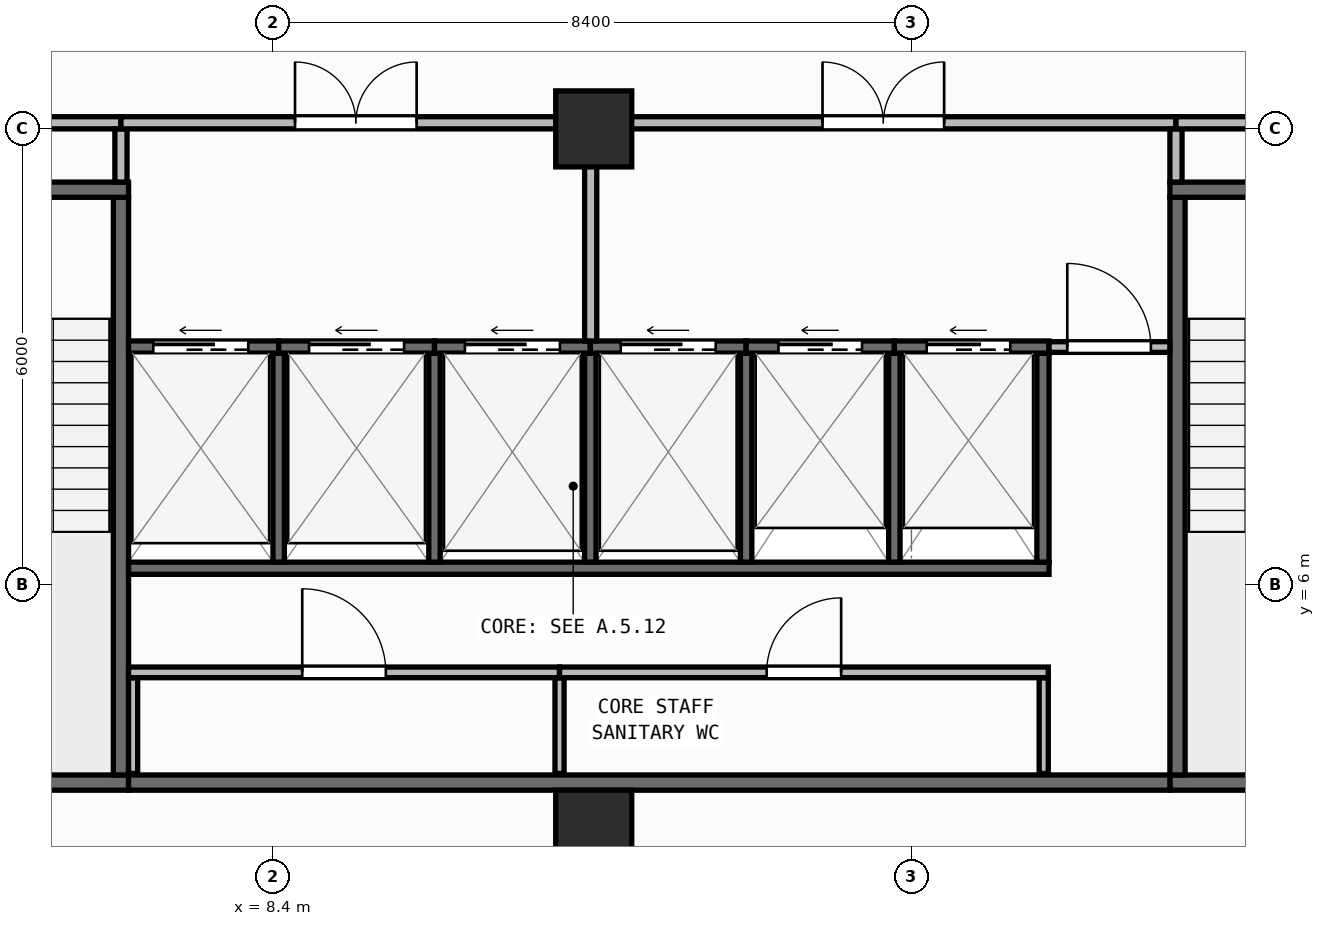
"""IFC4 building model, lengths in metres.
Left out: names, types, materials, properties, quantities, classifications, styles, units other than length and angle.
Written with IfcOpenShell. Run it as: python <this file> out.ifc"""

import sys

from ifc_helpers import new_model, si_unit, direction, frame, frame_2d, origin, origin_2d, place, context, subcontext, project, spatial, rectangle, extrude, element, fill, save


model = new_model("IFC4")
c1 = context("Model", 3, precision=1e-05, world=origin(), true_north=direction((0.0, 1.0)))
c2 = subcontext(c1, "Body", "Model", "MODEL_VIEW")
j1 = project(units=[si_unit("LENGTHUNIT", "METRE"), si_unit("PLANEANGLEUNIT", "RADIAN")], contexts=[c1])
p1 = place(None, origin())
s1 = spatial("IfcSite", under=j1, at=p1, CompositionType="ELEMENT")
p2 = place(p1, origin())
s2 = spatial("IfcBuilding", under=s1, at=p2, CompositionType="ELEMENT")
p3 = place(p2, frame((0.0, 0.0, 231.6)))
s3 = spatial("IfcBuildingStorey", under=s2, at=p3, CompositionType="ELEMENT", Elevation=231.6)
for number, where, z_axis, x_axis in (
    (1, (12.62, 2.8, 0.0), (0.0, 0.0, 1.0), (1.0, 0.0, 0.0)),
    (2, (12.62, 12.0, 0.0), (0.0, 0.0, 1.0), (1.0, 0.0, 0.0)),
):
    element("IfcColumn", number, at=place(p3, frame(where, z_axis=z_axis, x_axis=x_axis)), inside=s3, PredefinedType="COLUMN", context=c2, shape_type="SweptSolid", body=[
        extrude(rectangle(XDim=1.0, YDim=1.0, at=origin_2d()), origin(), (0.0, 0.0, 1.0), 3.95),
    ])
p4 = place(p3, frame((2.66, 0.174, 0.0), z_axis=(0.0, 0.0, 1.0), x_axis=(0.996634028439, 0.081979347142, 0.0)))
e3 = element("IfcWall", 3, at=p4, inside=s3, PredefinedType="STANDARD", context=c2, shape_type="SweptSolid", body=[
    extrude(rectangle(XDim=46.035, YDim=0.26, at=frame_2d((23.018, 0.0))), origin(), (0.0, 0.0, 1.0), 3.67),
])
p5 = place(p4, frame((21.817, 0.0, 0.9)))
e4 = element("IfcOpeningElement", 4, at=p5, cuts=e3, PredefinedType="OPENING", context=c2, shape_type="SweptSolid", body=[
    extrude(rectangle(XDim=2.4, YDim=1.65, at=frame_2d((1.2, 0.825))), frame((0.0, 0.14, 0.0), z_axis=(0.0, -1.0, 0.0), x_axis=(1.0, 0.0, 0.0)), (0.0, 0.0, 1.0), 0.28),
])
p6 = place(p3, frame((2.8, 3.4, 0.0), z_axis=(0.0, 0.0, 1.0), x_axis=(1.0, 0.0, 0.0)))
e5 = element("IfcWall", 5, at=p6, inside=s3, PredefinedType="SHEAR", context=c2, shape_type="SweptSolid", body=[
    extrude(rectangle(XDim=3.7, YDim=0.2, at=frame_2d((1.85, 0.0))), origin(), (0.0, 0.0, 1.0), 3.67),
])
p7 = place(p3, frame((6.4, 3.5, 0.0), z_axis=(0.0, 0.0, 1.0), x_axis=(0.0, 1.0, 0.0)))
e6 = element("IfcWall", 6, at=p7, inside=s3, PredefinedType="SHEAR", context=c2, shape_type="SweptSolid", body=[
    extrude(rectangle(XDim=7.6, YDim=0.2, at=frame_2d((3.8, 0.0))), origin(), (0.0, 0.0, 1.0), 3.67),
])
p8 = place(p3, frame((2.8, 11.2, 0.0), z_axis=(0.0, 0.0, 1.0), x_axis=(1.0, 0.0, 0.0)))
e7 = element("IfcWall", 7, at=p8, inside=s3, PredefinedType="SHEAR", context=c2, shape_type="SweptSolid", body=[
    extrude(rectangle(XDim=3.7, YDim=0.2, at=frame_2d((1.85, 0.0))), origin(), (0.0, 0.0, 1.0), 3.67),
])
p9 = place(p8, frame((1.2, 0.0, 0.0)))
e8 = element("IfcOpeningElement", 8, at=p9, cuts=e7, PredefinedType="OPENING", context=c2, shape_type="SweptSolid", body=[
    extrude(rectangle(XDim=1.3, YDim=2.15, at=frame_2d((0.65, 1.075))), frame((0.0, 0.11, 0.0), z_axis=(0.0, -1.0, 0.0), x_axis=(1.0, 0.0, 0.0)), (0.0, 0.0, 1.0), 0.22),
])
p10 = place(p3, frame((20.2, 3.4, 0.0), z_axis=(0.0, 0.0, 1.0), x_axis=(1.0, 0.0, 0.0)))
e9 = element("IfcWall", 9, at=p10, inside=s3, PredefinedType="SHEAR", context=c2, shape_type="SweptSolid", body=[
    extrude(rectangle(XDim=3.7, YDim=0.2, at=frame_2d((1.85, 0.0))), origin(), (0.0, 0.0, 1.0), 3.67),
])
p11 = place(p3, frame((20.3, 3.5, 0.0), z_axis=(0.0, 0.0, 1.0), x_axis=(0.0, 1.0, 0.0)))
e10 = element("IfcWall", 10, at=p11, inside=s3, PredefinedType="SHEAR", context=c2, shape_type="SweptSolid", body=[
    extrude(rectangle(XDim=7.6, YDim=0.2, at=frame_2d((3.8, 0.0))), origin(), (0.0, 0.0, 1.0), 3.67),
])
p12 = place(p3, frame((20.2, 11.2, 0.0), z_axis=(0.0, 0.0, 1.0), x_axis=(1.0, 0.0, 0.0)))
e11 = element("IfcWall", 11, at=p12, inside=s3, PredefinedType="SHEAR", context=c2, shape_type="SweptSolid", body=[
    extrude(rectangle(XDim=3.7, YDim=0.2, at=frame_2d((1.85, 0.0))), origin(), (0.0, 0.0, 1.0), 3.67),
])
p13 = place(p12, frame((1.2, 0.0, 0.0)))
e12 = element("IfcOpeningElement", 12, at=p13, cuts=e11, PredefinedType="OPENING", context=c2, shape_type="SweptSolid", body=[
    extrude(rectangle(XDim=1.3, YDim=2.15, at=frame_2d((0.65, 1.075))), frame((0.0, 0.11, 0.0), z_axis=(0.0, -1.0, 0.0), x_axis=(1.0, 0.0, 0.0)), (0.0, 0.0, 1.0), 0.22),
])
p14 = place(p3, frame((6.5, 3.4, 0.0), z_axis=(0.0, 0.0, 1.0), x_axis=(1.0, 0.0, 0.0)))
e13 = element("IfcWall", 13, at=p14, inside=s3, PredefinedType="SHEAR", context=c2, shape_type="SweptSolid", body=[
    extrude(rectangle(XDim=13.7, YDim=0.2, at=frame_2d((6.85, 0.0))), origin(), (0.0, 0.0, 1.0), 3.67),
])
p15 = place(p3, frame((6.5, 6.22, 0.0), z_axis=(0.0, 0.0, 1.0), x_axis=(1.0, 0.0, 0.0)))
e14 = element("IfcWall", 14, at=p15, inside=s3, PredefinedType="SHEAR", context=c2, shape_type="SweptSolid", body=[
    extrude(rectangle(XDim=12.11, YDim=0.16, at=frame_2d((6.055, 0.0))), origin(), (0.0, 0.0, 1.0), 3.67),
])
p16 = place(p3, frame((18.53, 6.3, 0.0), z_axis=(0.0, 0.0, 1.0), x_axis=(0.0, 1.0, 0.0)))
e15 = element("IfcWall", 15, at=p16, inside=s3, PredefinedType="SHEAR", context=c2, shape_type="SweptSolid", body=[
    extrude(rectangle(XDim=2.75, YDim=0.16, at=frame_2d((1.375, 0.0))), origin(), (0.0, 0.0, 1.0), 3.67),
])
for number, where, z_axis, x_axis in (
    (16, (8.475, 6.3, 0.0), (0.0, 0.0, 1.0), (0.0, 1.0, 0.0)),
    (17, (10.525, 6.3, 0.0), (0.0, 0.0, 1.0), (0.0, 1.0, 0.0)),
    (18, (12.575, 6.3, 0.0), (0.0, 0.0, 1.0), (0.0, 1.0, 0.0)),
    (19, (14.625, 6.3, 0.0), (0.0, 0.0, 1.0), (0.0, 1.0, 0.0)),
    (20, (16.575, 6.3, 0.0), (0.0, 0.0, 1.0), (0.0, 1.0, 0.0)),
):
    element("IfcWall", number, at=place(p3, frame(where, z_axis=z_axis, x_axis=x_axis)), inside=s3, PredefinedType="SHEAR", context=c2, shape_type="SweptSolid", body=[
        extrude(rectangle(XDim=2.75, YDim=0.15, at=frame_2d((1.375, 0.0))), origin(), (0.0, 0.0, 1.0), 3.67),
    ])
p17 = place(p3, frame((6.5, 9.13, 0.0), z_axis=(0.0, 0.0, 1.0), x_axis=(1.0, 0.0, 0.0)))
e21 = element("IfcWall", 21, at=p17, inside=s3, PredefinedType="SHEAR", context=c2, shape_type="SweptSolid", body=[
    extrude(rectangle(XDim=1.975, YDim=0.16, at=frame_2d((0.988, 0.0))), origin(), (0.0, 0.0, 1.0), 3.67),
])
p18 = place(p17, frame((0.325, 0.0, 0.0)))
e22 = element("IfcOpeningElement", 22, at=p18, cuts=e21, PredefinedType="OPENING", context=c2, shape_type="SweptSolid", body=[
    extrude(rectangle(XDim=1.25, YDim=2.15, at=frame_2d((0.625, 1.075))), frame((0.0, 0.09, 0.0), z_axis=(0.0, -1.0, 0.0), x_axis=(1.0, 0.0, 0.0)), (0.0, 0.0, 1.0), 0.18),
])
p19 = place(p3, frame((8.475, 9.13, 0.0), z_axis=(0.0, 0.0, 1.0), x_axis=(1.0, 0.0, 0.0)))
e23 = element("IfcWall", 23, at=p19, inside=s3, PredefinedType="SHEAR", context=c2, shape_type="SweptSolid", body=[
    extrude(rectangle(XDim=2.05, YDim=0.16, at=frame_2d((1.025, 0.0))), origin(), (0.0, 0.0, 1.0), 3.67),
])
p20 = place(p19, frame((0.4, 0.0, 0.0)))
e24 = element("IfcOpeningElement", 24, at=p20, cuts=e23, PredefinedType="OPENING", context=c2, shape_type="SweptSolid", body=[
    extrude(rectangle(XDim=1.25, YDim=2.15, at=frame_2d((0.625, 1.075))), frame((0.0, 0.09, 0.0), z_axis=(0.0, -1.0, 0.0), x_axis=(1.0, 0.0, 0.0)), (0.0, 0.0, 1.0), 0.18),
])
p21 = place(p3, frame((10.525, 9.13, 0.0), z_axis=(0.0, 0.0, 1.0), x_axis=(1.0, 0.0, 0.0)))
e25 = element("IfcWall", 25, at=p21, inside=s3, PredefinedType="SHEAR", context=c2, shape_type="SweptSolid", body=[
    extrude(rectangle(XDim=2.05, YDim=0.16, at=frame_2d((1.025, 0.0))), origin(), (0.0, 0.0, 1.0), 3.67),
])
p22 = place(p21, frame((0.4, 0.0, 0.0)))
e26 = element("IfcOpeningElement", 26, at=p22, cuts=e25, PredefinedType="OPENING", context=c2, shape_type="SweptSolid", body=[
    extrude(rectangle(XDim=1.25, YDim=2.15, at=frame_2d((0.625, 1.075))), frame((0.0, 0.09, 0.0), z_axis=(0.0, -1.0, 0.0), x_axis=(1.0, 0.0, 0.0)), (0.0, 0.0, 1.0), 0.18),
])
p23 = place(p3, frame((12.575, 9.13, 0.0), z_axis=(0.0, 0.0, 1.0), x_axis=(1.0, 0.0, 0.0)))
e27 = element("IfcWall", 27, at=p23, inside=s3, PredefinedType="SHEAR", context=c2, shape_type="SweptSolid", body=[
    extrude(rectangle(XDim=2.05, YDim=0.16, at=frame_2d((1.025, 0.0))), origin(), (0.0, 0.0, 1.0), 3.67),
])
p24 = place(p23, frame((0.4, 0.0, 0.0)))
e28 = element("IfcOpeningElement", 28, at=p24, cuts=e27, PredefinedType="OPENING", context=c2, shape_type="SweptSolid", body=[
    extrude(rectangle(XDim=1.25, YDim=2.15, at=frame_2d((0.625, 1.075))), frame((0.0, 0.09, 0.0), z_axis=(0.0, -1.0, 0.0), x_axis=(1.0, 0.0, 0.0)), (0.0, 0.0, 1.0), 0.18),
])
p25 = place(p3, frame((14.625, 9.13, 0.0), z_axis=(0.0, 0.0, 1.0), x_axis=(1.0, 0.0, 0.0)))
e29 = element("IfcWall", 29, at=p25, inside=s3, PredefinedType="SHEAR", context=c2, shape_type="SweptSolid", body=[
    extrude(rectangle(XDim=1.95, YDim=0.16, at=frame_2d((0.975, 0.0))), origin(), (0.0, 0.0, 1.0), 3.67),
])
p26 = place(p25, frame((0.425, 0.0, 0.0)))
e30 = element("IfcOpeningElement", 30, at=p26, cuts=e29, PredefinedType="OPENING", context=c2, shape_type="SweptSolid", body=[
    extrude(rectangle(XDim=1.1, YDim=2.15, at=frame_2d((0.55, 1.075))), frame((0.0, 0.09, 0.0), z_axis=(0.0, -1.0, 0.0), x_axis=(1.0, 0.0, 0.0)), (0.0, 0.0, 1.0), 0.18),
])
p27 = place(p3, frame((16.575, 9.13, 0.0), z_axis=(0.0, 0.0, 1.0), x_axis=(1.0, 0.0, 0.0)))
e31 = element("IfcWall", 31, at=p27, inside=s3, PredefinedType="SHEAR", context=c2, shape_type="SweptSolid", body=[
    extrude(rectangle(XDim=2.035, YDim=0.16, at=frame_2d((1.018, 0.0))), origin(), (0.0, 0.0, 1.0), 3.67),
])
p28 = place(p27, frame((0.425, 0.0, 0.0)))
e32 = element("IfcOpeningElement", 32, at=p28, cuts=e31, PredefinedType="OPENING", context=c2, shape_type="SweptSolid", body=[
    extrude(rectangle(XDim=1.1, YDim=2.15, at=frame_2d((0.55, 1.075))), frame((0.0, 0.09, 0.0), z_axis=(0.0, -1.0, 0.0), x_axis=(1.0, 0.0, 0.0)), (0.0, 0.0, 1.0), 0.18),
])
for number, where, z_axis, x_axis in (
    (33, (6.56, 3.52, 0.0), (0.0, 0.0, 1.0), (0.0, 1.0, 0.0)),
    (34, (12.17, 3.52, 0.0), (0.0, 0.0, 1.0), (0.0, 1.0, 0.0)),
    (35, (18.54, 3.52, 0.0), (0.0, 0.0, 1.0), (0.0, 1.0, 0.0)),
):
    element("IfcWall", number, at=place(p3, frame(where, z_axis=z_axis, x_axis=x_axis)), inside=s3, PredefinedType="PARTITIONING", context=c2, shape_type="SweptSolid", body=[
        extrude(rectangle(XDim=1.26, YDim=0.12, at=frame_2d((0.63, 0.0))), origin(), (0.0, 0.0, 1.0), 3.67),
    ])
p29 = place(p3, frame((6.5, 4.85, 0.0), z_axis=(0.0, 0.0, 1.0), x_axis=(1.0, 0.0, 0.0)))
e36 = element("IfcWall", 36, at=p29, inside=s3, PredefinedType="PARTITIONING", context=c2, shape_type="SweptSolid", body=[
    extrude(rectangle(XDim=5.67, YDim=0.14, at=frame_2d((2.835, 0.0))), origin(), (0.0, 0.0, 1.0), 3.67),
])
p30 = place(p29, frame((2.285, 0.0, 0.0)))
e37 = element("IfcOpeningElement", 37, at=p30, cuts=e36, PredefinedType="OPENING", context=c2, shape_type="SweptSolid", body=[
    extrude(rectangle(XDim=1.1, YDim=2.1, at=frame_2d((0.55, 1.05))), frame((0.0, 0.08, 0.0), z_axis=(0.0, -1.0, 0.0), x_axis=(1.0, 0.0, 0.0)), (0.0, 0.0, 1.0), 0.16),
])
p31 = place(p3, frame((12.17, 4.85, 0.0), z_axis=(0.0, 0.0, 1.0), x_axis=(1.0, 0.0, 0.0)))
e38 = element("IfcWall", 38, at=p31, inside=s3, PredefinedType="PARTITIONING", context=c2, shape_type="SweptSolid", body=[
    extrude(rectangle(XDim=6.43, YDim=0.14, at=frame_2d((3.215, 0.0))), origin(), (0.0, 0.0, 1.0), 3.67),
])
p32 = place(p31, frame((2.725, 0.0, 0.0)))
e39 = element("IfcOpeningElement", 39, at=p32, cuts=e38, PredefinedType="OPENING", context=c2, shape_type="SweptSolid", body=[
    extrude(rectangle(XDim=0.98, YDim=2.1, at=frame_2d((0.49, 1.05))), frame((0.0, 0.08, 0.0), z_axis=(0.0, -1.0, 0.0), x_axis=(1.0, 0.0, 0.0)), (0.0, 0.0, 1.0), 0.16),
])
p33 = place(p3, frame((18.61, 9.13, 0.0), z_axis=(0.0, 0.0, 1.0), x_axis=(1.0, 0.0, 0.0)))
e40 = element("IfcWall", 40, at=p33, inside=s3, PredefinedType="PARTITIONING", context=c2, shape_type="SweptSolid", body=[
    extrude(rectangle(XDim=1.59, YDim=0.14, at=frame_2d((0.795, 0.0))), origin(), (0.0, 0.0, 1.0), 3.67),
])
p34 = place(p33, frame((0.24, 0.0, 0.0)))
e41 = element("IfcOpeningElement", 41, at=p34, cuts=e40, PredefinedType="OPENING", context=c2, shape_type="SweptSolid", body=[
    extrude(rectangle(XDim=1.1, YDim=2.1, at=frame_2d((0.55, 1.05))), frame((0.0, 0.08, 0.0), z_axis=(0.0, -1.0, 0.0), x_axis=(1.0, 0.0, 0.0)), (0.0, 0.0, 1.0), 0.16),
])
p35 = place(p3, frame((2.8, 12.08, 0.0), z_axis=(0.0, 0.0, 1.0), x_axis=(1.0, 0.0, 0.0)))
e42 = element("IfcWall", 42, at=p35, inside=s3, PredefinedType="PARTITIONING", context=c2, shape_type="SweptSolid", body=[
    extrude(rectangle(XDim=3.6, YDim=0.16, at=frame_2d((1.8, 0.0))), origin(), (0.0, 0.0, 1.0), 3.112),
])
p36 = place(p35, frame((1.0, 0.0, 0.0)))
e43 = element("IfcOpeningElement", 43, at=p36, cuts=e42, PredefinedType="OPENING", context=c2, shape_type="SweptSolid", body=[
    extrude(rectangle(XDim=1.6, YDim=2.05, at=frame_2d((0.8, 1.025))), frame((0.0, 0.09, 0.0), z_axis=(0.0, -1.0, 0.0), x_axis=(1.0, 0.0, 0.0)), (0.0, 0.0, 1.0), 0.18),
])
p37 = place(p3, frame((6.4, 11.3, 0.0), z_axis=(0.0, 0.0, 1.0), x_axis=(0.0, 1.0, 0.0)))
e44 = element("IfcWall", 44, at=p37, inside=s3, PredefinedType="PARTITIONING", context=c2, shape_type="SweptSolid", body=[
    extrude(rectangle(XDim=0.7, YDim=0.16, at=frame_2d((0.35, 0.0))), origin(), (0.0, 0.0, 1.0), 3.67),
])
p38 = place(p3, frame((6.4, 12.08, 0.0), z_axis=(0.0, 0.0, 1.0), x_axis=(1.0, 0.0, 0.0)))
e45 = element("IfcWall", 45, at=p38, inside=s3, PredefinedType="PARTITIONING", context=c2, shape_type="SweptSolid", body=[
    extrude(rectangle(XDim=6.18, YDim=0.16, at=frame_2d((3.09, 0.0))), origin(), (0.0, 0.0, 1.0), 3.112),
])
p39 = place(p38, frame((2.29, 0.0, 0.0)))
e46 = element("IfcOpeningElement", 46, at=p39, cuts=e45, PredefinedType="OPENING", context=c2, shape_type="SweptSolid", body=[
    extrude(rectangle(XDim=1.6, YDim=2.05, at=frame_2d((0.8, 1.025))), frame((0.0, 0.09, 0.0), z_axis=(0.0, -1.0, 0.0), x_axis=(1.0, 0.0, 0.0)), (0.0, 0.0, 1.0), 0.18),
])
p40 = place(p3, frame((12.58, 9.21, 0.0), z_axis=(0.0, 0.0, 1.0), x_axis=(0.0, 1.0, 0.0)))
e47 = element("IfcWall", 47, at=p40, inside=s3, PredefinedType="PARTITIONING", context=c2, shape_type="SweptSolid", body=[
    extrude(rectangle(XDim=2.79, YDim=0.16, at=frame_2d((1.395, 0.0))), origin(), (0.0, 0.0, 1.0), 3.67),
])
p41 = place(p3, frame((12.58, 12.08, 0.0), z_axis=(0.0, 0.0, 1.0), x_axis=(1.0, 0.0, 0.0)))
e48 = element("IfcWall", 48, at=p41, inside=s3, PredefinedType="PARTITIONING", context=c2, shape_type="SweptSolid", body=[
    extrude(rectangle(XDim=7.7, YDim=0.16, at=frame_2d((3.85, 0.0))), origin(), (0.0, 0.0, 1.0), 3.112),
])
p42 = place(p41, frame((3.05, 0.0, 0.0)))
e49 = element("IfcOpeningElement", 49, at=p42, cuts=e48, PredefinedType="OPENING", context=c2, shape_type="SweptSolid", body=[
    extrude(rectangle(XDim=1.6, YDim=2.05, at=frame_2d((0.8, 1.025))), frame((0.0, 0.09, 0.0), z_axis=(0.0, -1.0, 0.0), x_axis=(1.0, 0.0, 0.0)), (0.0, 0.0, 1.0), 0.18),
])
p43 = place(p3, frame((20.28, 11.3, 0.0), z_axis=(0.0, 0.0, 1.0), x_axis=(0.0, 1.0, 0.0)))
e50 = element("IfcWall", 50, at=p43, inside=s3, PredefinedType="PARTITIONING", context=c2, shape_type="SweptSolid", body=[
    extrude(rectangle(XDim=0.7, YDim=0.16, at=frame_2d((0.35, 0.0))), origin(), (0.0, 0.0, 1.0), 3.67),
])
p44 = place(p3, frame((20.28, 12.08, 0.0), z_axis=(0.0, 0.0, 1.0), x_axis=(1.0, 0.0, 0.0)))
e51 = element("IfcWall", 51, at=p44, inside=s3, PredefinedType="PARTITIONING", context=c2, shape_type="SweptSolid", body=[
    extrude(rectangle(XDim=3.62, YDim=0.16, at=frame_2d((1.81, 0.0))), origin(), (0.0, 0.0, 1.0), 3.112),
])
p45 = place(p44, frame((1.01, 0.0, 0.0)))
e52 = element("IfcOpeningElement", 52, at=p45, cuts=e51, PredefinedType="OPENING", context=c2, shape_type="SweptSolid", body=[
    extrude(rectangle(XDim=1.6, YDim=2.05, at=frame_2d((0.8, 1.025))), frame((0.0, 0.09, 0.0), z_axis=(0.0, -1.0, 0.0), x_axis=(1.0, 0.0, 0.0)), (0.0, 0.0, 1.0), 0.18),
])
p46 = place(p18, origin())
e53 = element("IfcDoor", 53, at=p46, inside=s3, OperationType="SLIDING_TO_LEFT", PredefinedType="DOOR", context=c2, shape_type="SweptSolid", body=[
    extrude(rectangle(XDim=1.25, YDim=2.15, at=frame_2d((0.625, 1.075))), frame((0.0, 0.025, 0.0), z_axis=(0.0, -1.0, 0.0), x_axis=(1.0, 0.0, 0.0)), (0.0, 0.0, 1.0), 0.05),
])
fill(e22, e53)
p47 = place(p20, origin())
e54 = element("IfcDoor", 54, at=p47, inside=s3, OperationType="SLIDING_TO_LEFT", PredefinedType="DOOR", context=c2, shape_type="SweptSolid", body=[
    extrude(rectangle(XDim=1.25, YDim=2.15, at=frame_2d((0.625, 1.075))), frame((0.0, 0.025, 0.0), z_axis=(0.0, -1.0, 0.0), x_axis=(1.0, 0.0, 0.0)), (0.0, 0.0, 1.0), 0.05),
])
fill(e24, e54)
p48 = place(p22, origin())
e55 = element("IfcDoor", 55, at=p48, inside=s3, OperationType="SLIDING_TO_LEFT", PredefinedType="DOOR", context=c2, shape_type="SweptSolid", body=[
    extrude(rectangle(XDim=1.25, YDim=2.15, at=frame_2d((0.625, 1.075))), frame((0.0, 0.025, 0.0), z_axis=(0.0, -1.0, 0.0), x_axis=(1.0, 0.0, 0.0)), (0.0, 0.0, 1.0), 0.05),
])
fill(e26, e55)
p49 = place(p24, origin())
e56 = element("IfcDoor", 56, at=p49, inside=s3, OperationType="SLIDING_TO_LEFT", PredefinedType="DOOR", context=c2, shape_type="SweptSolid", body=[
    extrude(rectangle(XDim=1.25, YDim=2.15, at=frame_2d((0.625, 1.075))), frame((0.0, 0.025, 0.0), z_axis=(0.0, -1.0, 0.0), x_axis=(1.0, 0.0, 0.0)), (0.0, 0.0, 1.0), 0.05),
])
fill(e28, e56)
p50 = place(p26, origin())
e57 = element("IfcDoor", 57, at=p50, inside=s3, OperationType="SLIDING_TO_LEFT", PredefinedType="DOOR", context=c2, shape_type="SweptSolid", body=[
    extrude(rectangle(XDim=1.1, YDim=2.15, at=frame_2d((0.55, 1.075))), frame((0.0, 0.025, 0.0), z_axis=(0.0, -1.0, 0.0), x_axis=(1.0, 0.0, 0.0)), (0.0, 0.0, 1.0), 0.05),
])
fill(e30, e57)
p51 = place(p28, origin())
e58 = element("IfcDoor", 58, at=p51, inside=s3, OperationType="SLIDING_TO_LEFT", PredefinedType="DOOR", context=c2, shape_type="SweptSolid", body=[
    extrude(rectangle(XDim=1.1, YDim=2.15, at=frame_2d((0.55, 1.075))), frame((0.0, 0.025, 0.0), z_axis=(0.0, -1.0, 0.0), x_axis=(1.0, 0.0, 0.0)), (0.0, 0.0, 1.0), 0.05),
])
fill(e32, e58)
p52 = place(p30, origin())
e59 = element("IfcDoor", 59, at=p52, inside=s3, OperationType="SINGLE_SWING_LEFT", PredefinedType="DOOR", context=c2, shape_type="SweptSolid", body=[
    extrude(rectangle(XDim=1.1, YDim=2.1, at=frame_2d((0.55, 1.05))), frame((0.0, 0.025, 0.0), z_axis=(0.0, -1.0, 0.0), x_axis=(1.0, 0.0, 0.0)), (0.0, 0.0, 1.0), 0.05),
])
fill(e37, e59)
p53 = place(p32, origin())
e60 = element("IfcDoor", 60, at=p53, inside=s3, OperationType="SINGLE_SWING_RIGHT", PredefinedType="DOOR", context=c2, shape_type="SweptSolid", body=[
    extrude(rectangle(XDim=0.98, YDim=2.1, at=frame_2d((0.49, 1.05))), frame((0.0, 0.025, 0.0), z_axis=(0.0, -1.0, 0.0), x_axis=(1.0, 0.0, 0.0)), (0.0, 0.0, 1.0), 0.05),
])
fill(e39, e60)
p54 = place(p34, origin())
e61 = element("IfcDoor", 61, at=p54, inside=s3, OperationType="SINGLE_SWING_LEFT", PredefinedType="DOOR", context=c2, shape_type="SweptSolid", body=[
    extrude(rectangle(XDim=1.1, YDim=2.1, at=frame_2d((0.55, 1.05))), frame((0.0, 0.025, 0.0), z_axis=(0.0, -1.0, 0.0), x_axis=(1.0, 0.0, 0.0)), (0.0, 0.0, 1.0), 0.05),
])
fill(e41, e61)
p55 = place(p39, origin())
e62 = element("IfcDoor", 62, at=p55, inside=s3, OperationType="DOUBLE_DOOR_SINGLE_SWING", PredefinedType="DOOR", context=c2, shape_type="SweptSolid", body=[
    extrude(rectangle(XDim=1.6, YDim=2.05, at=frame_2d((0.8, 1.025))), frame((0.0, 0.025, 0.0), z_axis=(0.0, -1.0, 0.0), x_axis=(1.0, 0.0, 0.0)), (0.0, 0.0, 1.0), 0.05),
])
fill(e46, e62)
p56 = place(p42, origin())
e63 = element("IfcDoor", 63, at=p56, inside=s3, OperationType="DOUBLE_DOOR_SINGLE_SWING", PredefinedType="DOOR", context=c2, shape_type="SweptSolid", body=[
    extrude(rectangle(XDim=1.6, YDim=2.05, at=frame_2d((0.8, 1.025))), frame((0.0, 0.025, 0.0), z_axis=(0.0, -1.0, 0.0), x_axis=(1.0, 0.0, 0.0)), (0.0, 0.0, 1.0), 0.05),
])
fill(e49, e63)
save(model, sys.argv[1])
